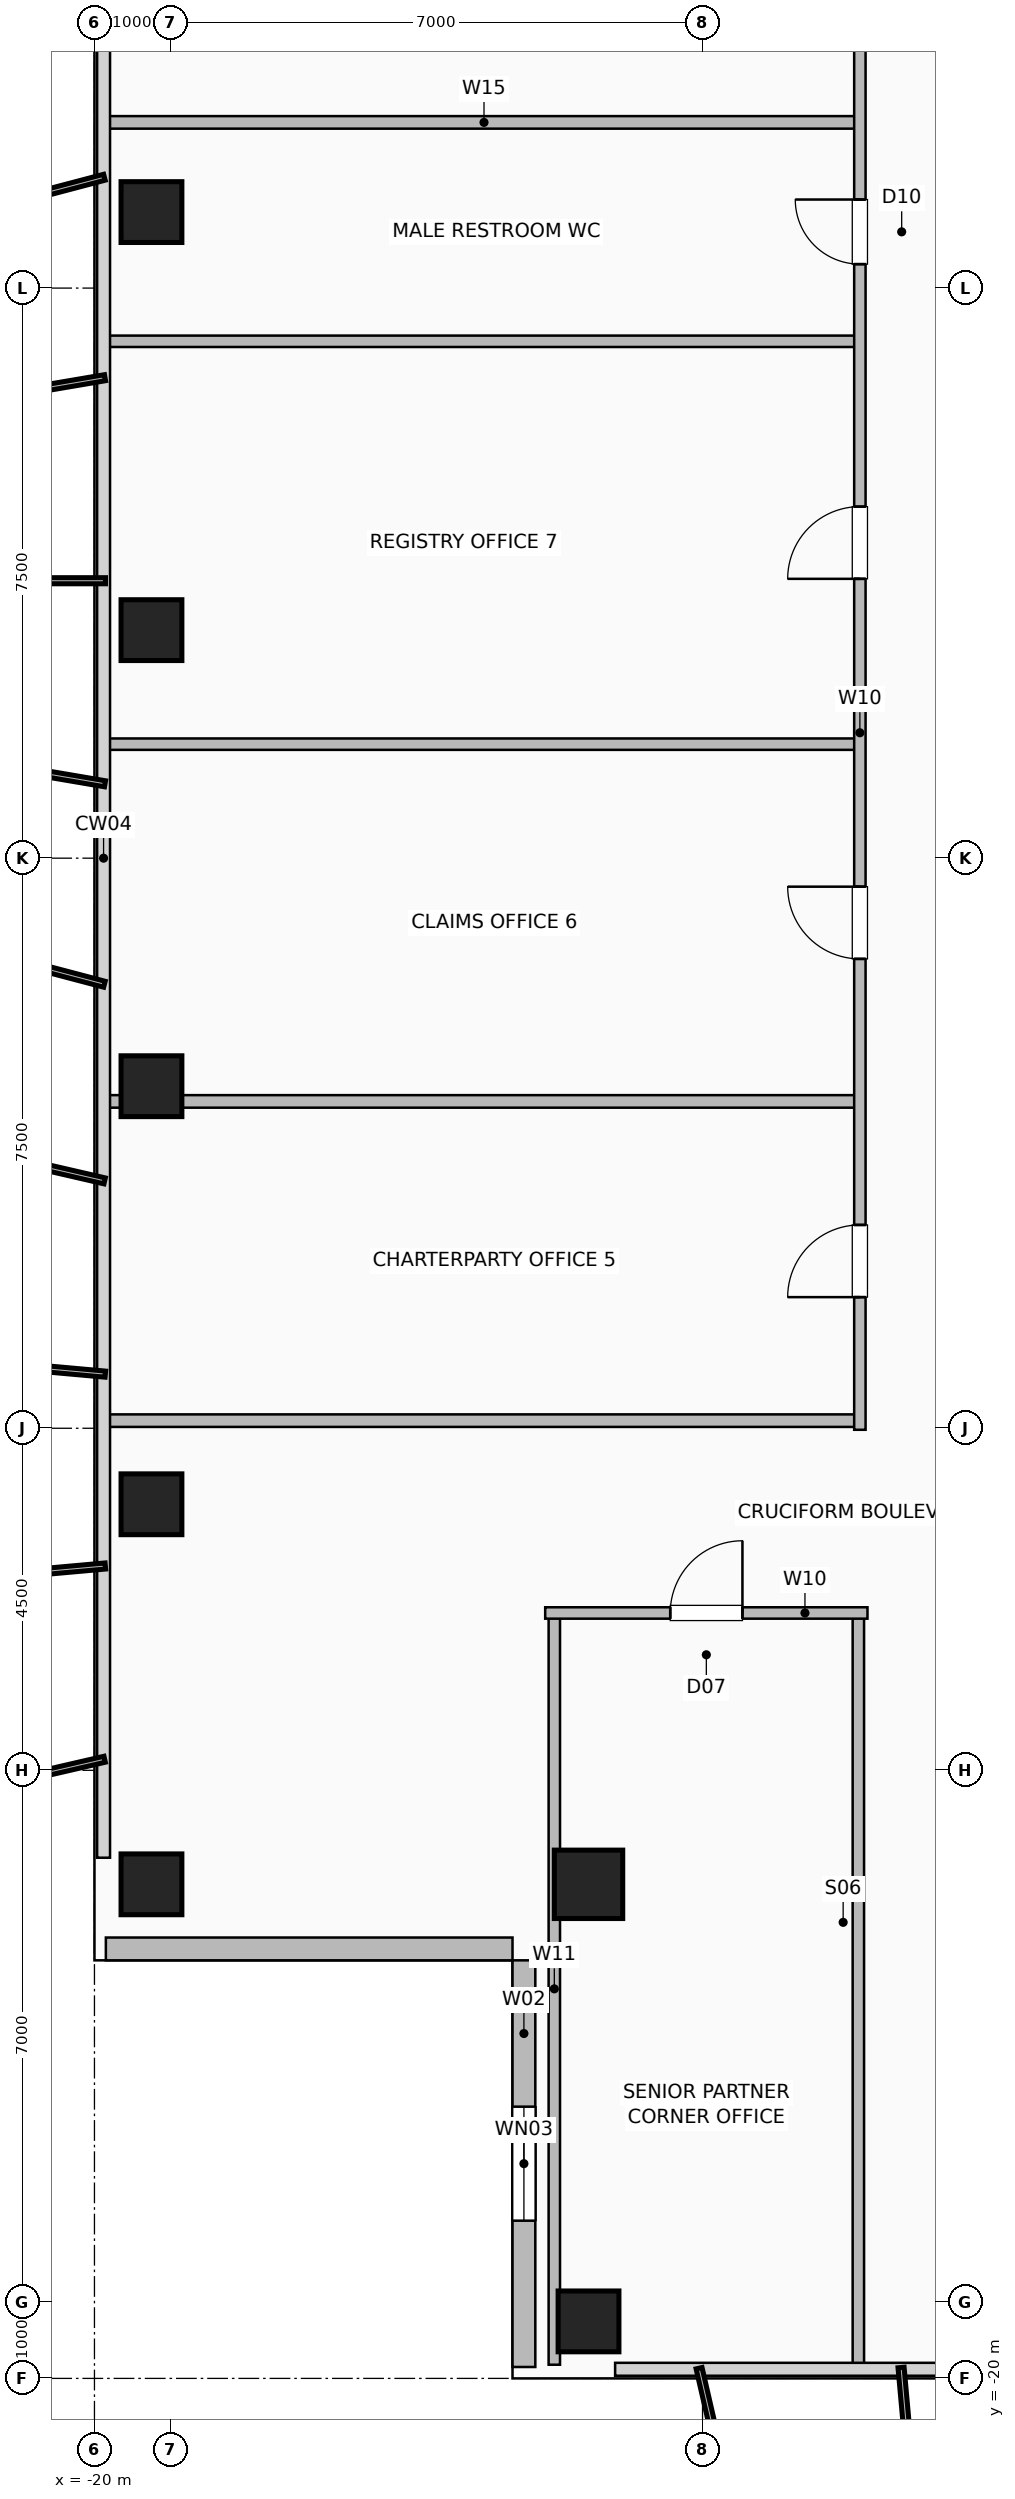
"""IFC4 building model, lengths in metres.
Left out: names, types, materials, properties, quantities, classifications, styles, units other than length and angle.
Written with IfcOpenShell. Run it as: python <this file> out.ifc"""

import sys

from ifc_helpers import new_model, si_unit, direction, frame, frame_2d, origin, origin_2d, place, context, subcontext, project, spatial, rectangle, hollow_rectangle, extrude, element, fill, save


model = new_model("IFC4")
c1 = context("Model", 3, precision=1e-05, world=origin(), true_north=direction((0.0, 1.0)))
c2 = subcontext(c1, "Body", "Model", "MODEL_VIEW")
j1 = project(units=[si_unit("LENGTHUNIT", "METRE"), si_unit("PLANEANGLEUNIT", "RADIAN")], contexts=[c1])
p1 = place(None, origin())
s1 = spatial("IfcSite", under=j1, at=p1, CompositionType="ELEMENT")
p2 = place(p1, origin())
s2 = spatial("IfcBuilding", under=s1, at=p2, CompositionType="ELEMENT")
p3 = place(p2, frame((0.0, 0.0, 173.4)))
s3 = spatial("IfcBuildingStorey", under=s2, at=p3, CompositionType="ELEMENT", Elevation=173.4)
for number, where, z_axis, x_axis in (
    (1, (-13.5, -19.25, 0.0), (0.0, 0.0, 1.0), (1.0, 0.0, 0.0)),
    (2, (-19.25, -13.5, 0.0), (0.0, 0.0, 1.0), (1.0, 0.0, 0.0)),
    (3, (-19.25, -8.5, 0.0), (0.0, 0.0, 1.0), (1.0, 0.0, 0.0)),
    (4, (-19.25, -3.0, 0.0), (0.0, 0.0, 1.0), (1.0, 0.0, 0.0)),
    (5, (-19.25, 3.0, 0.0), (0.0, 0.0, 1.0), (1.0, 0.0, 0.0)),
    (6, (-19.25, 8.5, 0.0), (0.0, 0.0, 1.0), (1.0, 0.0, 0.0)),
):
    element("IfcColumn", number, at=place(p3, frame(where, z_axis=z_axis, x_axis=x_axis)), inside=s3, PredefinedType="COLUMN", context=c2, shape_type="SweptSolid", body=[
        extrude(hollow_rectangle(XDim=0.8, YDim=0.8, WallThickness=0.04, at=origin_2d()), origin(), (0.0, 0.0, 1.0), 3.6),
    ])
p4 = place(p3, frame((-13.5, -13.5, 0.0), z_axis=(0.0, 0.0, 1.0), x_axis=(1.0, 0.0, 0.0)))
e7 = element("IfcColumn", 7, at=p4, inside=s3, PredefinedType="COLUMN", context=c2, shape_type="SweptSolid", body=[
    extrude(hollow_rectangle(XDim=0.9, YDim=0.9, WallThickness=0.045, at=origin_2d()), origin(), (0.0, 0.0, 1.0), 3.6),
])
p5 = place(p3, frame((-14.35, -19.85, 0.0), z_axis=(0.0, 0.0, 1.0), x_axis=(0.0, 1.0, 0.0)))
e8 = element("IfcWall", 8, at=p5, inside=s3, PredefinedType="SOLIDWALL", context=c2, shape_type="SweptSolid", body=[
    extrude(rectangle(XDim=5.35, YDim=0.3, at=frame_2d((2.675, 0.0))), origin(), (0.0, 0.0, 1.0), 3.36),
])
p6 = place(p5, frame((1.925, 0.0, 0.9)))
e9 = element("IfcOpeningElement", 9, at=p6, cuts=e8, PredefinedType="OPENING", context=c2, shape_type="SweptSolid", body=[
    extrude(rectangle(XDim=1.5, YDim=1.8, at=frame_2d((0.75, 0.9))), frame((0.0, 0.16, 0.0), z_axis=(0.0, -1.0, 0.0), x_axis=(1.0, 0.0, 0.0)), (0.0, 0.0, 1.0), 0.32),
])
p7 = place(p3, frame((-19.85, -14.35, 0.0), z_axis=(0.0, 0.0, 1.0), x_axis=(1.0, 0.0, 0.0)))
e10 = element("IfcWall", 10, at=p7, inside=s3, PredefinedType="SOLIDWALL", context=c2, shape_type="SweptSolid", body=[
    extrude(rectangle(XDim=5.35, YDim=0.3, at=frame_2d((2.675, 0.0))), origin(), (0.0, 0.0, 1.0), 3.36),
])
for number, where, z_axis, x_axis in (
    (11, (-13.95, -19.82, 0.0), (0.0, 0.0, 1.0), (0.0, 1.0, 0.0)),
    (12, (-9.95, -19.82, 0.0), (0.0, 0.0, 1.0), (0.0, 1.0, 0.0)),
):
    element("IfcWall", number, at=place(p3, frame(where, z_axis=z_axis, x_axis=x_axis)), inside=s3, PredefinedType="PARTITIONING", context=c2, shape_type="SweptSolid", body=[
        extrude(rectangle(XDim=9.89, YDim=0.15, at=frame_2d((4.945, 0.0))), origin(), (0.0, 0.0, 1.0), 3.36),
    ])
p8 = place(p3, frame((-14.07, -9.93, 0.0), z_axis=(0.0, 0.0, 1.0), x_axis=(1.0, 0.0, 0.0)))
e13 = element("IfcWall", 13, at=p8, inside=s3, PredefinedType="PARTITIONING", context=c2, shape_type="SweptSolid", body=[
    extrude(rectangle(XDim=4.24, YDim=0.15, at=frame_2d((2.12, 0.0))), origin(), (0.0, 0.0, 1.0), 3.36),
])
p9 = place(p8, frame((1.645, 0.0, 0.0)))
e14 = element("IfcOpeningElement", 14, at=p9, cuts=e13, PredefinedType="OPENING", context=c2, shape_type="SweptSolid", body=[
    extrude(rectangle(XDim=0.95, YDim=2.06, at=frame_2d((0.475, 1.03))), frame((0.0, 0.085, 0.0), z_axis=(0.0, -1.0, 0.0), x_axis=(1.0, 0.0, 0.0)), (0.0, 0.0, 1.0), 0.17),
])
for number, where, z_axis, x_axis in (
    (15, (-19.82, 9.68, 0.0), (0.0, 0.0, 1.0), (1.0, 0.0, 0.0)),
    (16, (-19.82, -7.4, 0.0), (0.0, 0.0, 1.0), (1.0, 0.0, 0.0)),
    (17, (-19.82, -3.2, 0.0), (0.0, 0.0, 1.0), (1.0, 0.0, 0.0)),
):
    element("IfcWall", number, at=place(p3, frame(where, z_axis=z_axis, x_axis=x_axis)), inside=s3, PredefinedType="PLUMBINGWALL", context=c2, shape_type="SweptSolid", body=[
        extrude(rectangle(XDim=9.89, YDim=0.165, at=frame_2d((4.945, 0.0))), origin(), (0.0, 0.0, 1.0), 3.36),
    ])
for number, where, z_axis, x_axis in (
    (18, (-19.82, 1.5, 0.0), (0.0, 0.0, 1.0), (1.0, 0.0, 0.0)),
    (19, (-19.82, 6.8, 0.0), (0.0, 0.0, 1.0), (1.0, 0.0, 0.0)),
):
    element("IfcWall", number, at=place(p3, frame(where, z_axis=z_axis, x_axis=x_axis)), inside=s3, PredefinedType="PARTITIONING", context=c2, shape_type="SweptSolid", body=[
        extrude(rectangle(XDim=9.89, YDim=0.15, at=frame_2d((4.945, 0.0))), origin(), (0.0, 0.0, 1.0), 3.36),
    ])
p10 = place(p3, frame((-9.93, -7.52, 0.0), z_axis=(0.0, 0.0, 1.0), x_axis=(0.0, 1.0, 0.0)))
e20 = element("IfcWall", 20, at=p10, inside=s3, PredefinedType="PARTITIONING", context=c2, shape_type="SweptSolid", body=[
    extrude(rectangle(XDim=21.59, YDim=0.15, at=frame_2d((10.795, 0.0))), origin(), (0.0, 0.0, 1.0), 3.36),
])
p11 = place(p10, frame((1.745, 0.0, 0.0)))
e21 = element("IfcOpeningElement", 21, at=p11, cuts=e20, PredefinedType="OPENING", context=c2, shape_type="SweptSolid", body=[
    extrude(rectangle(XDim=0.95, YDim=2.06, at=frame_2d((0.475, 1.03))), frame((0.0, 0.085, 0.0), z_axis=(0.0, -1.0, 0.0), x_axis=(1.0, 0.0, 0.0)), (0.0, 0.0, 1.0), 0.17),
])
p12 = place(p10, frame((6.195, 0.0, 0.0)))
e22 = element("IfcOpeningElement", 22, at=p12, cuts=e20, PredefinedType="OPENING", context=c2, shape_type="SweptSolid", body=[
    extrude(rectangle(XDim=0.95, YDim=2.06, at=frame_2d((0.475, 1.03))), frame((0.0, 0.085, 0.0), z_axis=(0.0, -1.0, 0.0), x_axis=(1.0, 0.0, 0.0)), (0.0, 0.0, 1.0), 0.17),
])
p13 = place(p10, frame((11.195, 0.0, 0.0)))
e23 = element("IfcOpeningElement", 23, at=p13, cuts=e20, PredefinedType="OPENING", context=c2, shape_type="SweptSolid", body=[
    extrude(rectangle(XDim=0.95, YDim=2.06, at=frame_2d((0.475, 1.03))), frame((0.0, 0.085, 0.0), z_axis=(0.0, -1.0, 0.0), x_axis=(1.0, 0.0, 0.0)), (0.0, 0.0, 1.0), 0.17),
])
p14 = place(p10, frame((15.335, 0.0, 0.0)))
e24 = element("IfcOpeningElement", 24, at=p14, cuts=e20, PredefinedType="OPENING", context=c2, shape_type="SweptSolid", body=[
    extrude(rectangle(XDim=0.85, YDim=2.05, at=frame_2d((0.425, 1.025))), frame((0.0, 0.085, 0.0), z_axis=(0.0, -1.0, 0.0), x_axis=(1.0, 0.0, 0.0)), (0.0, 0.0, 1.0), 0.17),
])
p15 = place(p10, frame((18.86, 0.0, 0.0)))
e25 = element("IfcOpeningElement", 25, at=p15, cuts=e20, PredefinedType="OPENING", context=c2, shape_type="SweptSolid", body=[
    extrude(rectangle(XDim=0.95, YDim=2.06, at=frame_2d((0.475, 1.03))), frame((0.0, 0.085, 0.0), z_axis=(0.0, -1.0, 0.0), x_axis=(1.0, 0.0, 0.0)), (0.0, 0.0, 1.0), 0.17),
])
p16 = place(p6, origin())
e26 = element("IfcWindow", 26, at=p16, inside=s3, PartitioningType="SINGLE_PANEL", PredefinedType="WINDOW", context=c2, shape_type="SweptSolid", body=[
    extrude(rectangle(XDim=1.5, YDim=1.8, at=frame_2d((0.75, 0.9))), frame((0.0, 0.03, 0.0), z_axis=(0.0, -1.0, 0.0), x_axis=(1.0, 0.0, 0.0)), (0.0, 0.0, 1.0), 0.06),
])
fill(e9, e26)
p17 = place(p9, origin())
e27 = element("IfcDoor", 27, at=p17, inside=s3, OperationType="SINGLE_SWING_RIGHT", PredefinedType="DOOR", context=c2, shape_type="SweptSolid", body=[
    extrude(rectangle(XDim=0.95, YDim=2.06, at=frame_2d((0.475, 1.03))), frame((0.0, 0.025, 0.0), z_axis=(0.0, -1.0, 0.0), x_axis=(1.0, 0.0, 0.0)), (0.0, 0.0, 1.0), 0.05),
])
fill(e14, e27)
p18 = place(p11, origin())
e28 = element("IfcDoor", 28, at=p18, inside=s3, OperationType="SINGLE_SWING_LEFT", PredefinedType="DOOR", context=c2, shape_type="SweptSolid", body=[
    extrude(rectangle(XDim=0.95, YDim=2.06, at=frame_2d((0.475, 1.03))), frame((0.0, 0.025, 0.0), z_axis=(0.0, -1.0, 0.0), x_axis=(1.0, 0.0, 0.0)), (0.0, 0.0, 1.0), 0.05),
])
fill(e21, e28)
p19 = place(p12, origin())
e29 = element("IfcDoor", 29, at=p19, inside=s3, OperationType="SINGLE_SWING_RIGHT", PredefinedType="DOOR", context=c2, shape_type="SweptSolid", body=[
    extrude(rectangle(XDim=0.95, YDim=2.06, at=frame_2d((0.475, 1.03))), frame((0.0, 0.025, 0.0), z_axis=(0.0, -1.0, 0.0), x_axis=(1.0, 0.0, 0.0)), (0.0, 0.0, 1.0), 0.05),
])
fill(e22, e29)
p20 = place(p13, origin())
e30 = element("IfcDoor", 30, at=p20, inside=s3, OperationType="SINGLE_SWING_LEFT", PredefinedType="DOOR", context=c2, shape_type="SweptSolid", body=[
    extrude(rectangle(XDim=0.95, YDim=2.06, at=frame_2d((0.475, 1.03))), frame((0.0, 0.025, 0.0), z_axis=(0.0, -1.0, 0.0), x_axis=(1.0, 0.0, 0.0)), (0.0, 0.0, 1.0), 0.05),
])
fill(e23, e30)
p21 = place(p14, origin())
e31 = element("IfcDoor", 31, at=p21, inside=s3, OperationType="SINGLE_SWING_RIGHT", PredefinedType="DOOR", context=c2, shape_type="SweptSolid", body=[
    extrude(rectangle(XDim=0.85, YDim=2.05, at=frame_2d((0.425, 1.025))), frame((0.0, 0.025, 0.0), z_axis=(0.0, -1.0, 0.0), x_axis=(1.0, 0.0, 0.0)), (0.0, 0.0, 1.0), 0.05),
])
fill(e24, e31)
save(model, sys.argv[1])
